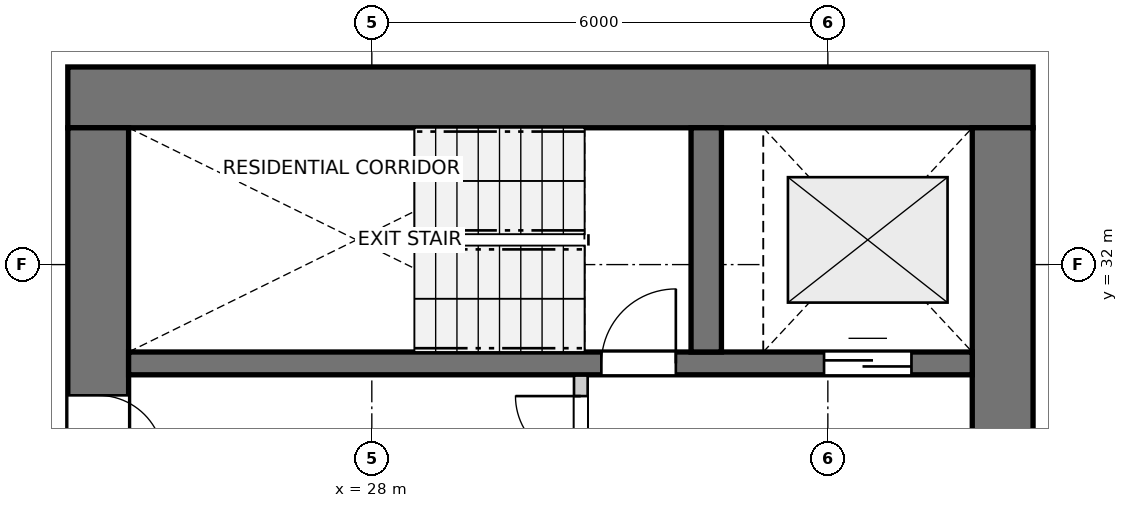
"""IFC4 building model, lengths in metres.
Left out: names, types, materials, properties, quantities, classifications, styles, units other than length and angle.
Written with IfcOpenShell. Run it as: python <this file> out.ifc"""

import sys

from ifc_helpers import new_model, si_unit, direction, frame, frame_2d, origin, place, context, subcontext, project, spatial, rectangle, extrude, source, transform, mapped, element, fill, save


model = new_model("IFC4")
c1 = context("Model", 3, precision=1e-05, world=origin(), true_north=direction((0.0, 1.0)))
c2 = subcontext(c1, "Body", "Model", "MODEL_VIEW")
j1 = project(units=[si_unit("LENGTHUNIT", "METRE"), si_unit("PLANEANGLEUNIT", "RADIAN")], contexts=[c1])
p1 = place(None, origin())
s1 = spatial("IfcSite", under=j1, at=p1, CompositionType="ELEMENT")
p2 = place(p1, origin())
s2 = spatial("IfcBuilding", under=s1, at=p2, CompositionType="ELEMENT")
p3 = place(p2, frame((0.0, 0.0, 11.0)))
s3 = spatial("IfcBuildingStorey", under=s2, at=p3, CompositionType="ELEMENT", Elevation=11.0)
p4 = place(p3, frame((36.7, 34.2, 0.0), z_axis=(0.0, 0.0, 1.0), x_axis=(-1.0, 0.0, 0.0)))
e1 = element("IfcWall", 1, at=p4, inside=s3, PredefinedType="SHEAR", context=c2, shape_type="SweptSolid", body=[
    extrude(rectangle(XDim=12.7, YDim=0.8, at=frame_2d((6.35, 0.0))), origin(), (0.0, 0.0, 1.0), 2.94),
])
p5 = place(p3, frame((24.4, 33.8, 0.0), z_axis=(0.0, 0.0, 1.0), x_axis=(0.0, -1.0, 0.0)))
e2 = element("IfcWall", 2, at=p5, inside=s3, PredefinedType="SHEAR", context=c2, shape_type="SweptSolid", body=[
    extrude(rectangle(XDim=15.6, YDim=0.8, at=frame_2d((7.8, 0.0))), origin(), (0.0, 0.0, 1.0), 2.94),
])
p6 = place(p5, frame((7.05, 0.0, 0.0)))
e3 = element("IfcOpeningElement", 3, at=p6, cuts=e2, PredefinedType="OPENING", context=c2, shape_type="SweptSolid", body=[
    extrude(rectangle(XDim=1.5, YDim=2.15, at=frame_2d((0.75, 1.075))), frame((0.0, 0.41, 0.0), z_axis=(0.0, -1.0, 0.0), x_axis=(1.0, 0.0, 0.0)), (0.0, 0.0, 1.0), 0.82),
])
p7 = place(p5, frame((3.52, 0.0, 0.0)))
e4 = element("IfcOpeningElement", 4, at=p7, cuts=e2, PredefinedType="OPENING", context=c2, shape_type="SweptSolid", body=[
    extrude(rectangle(XDim=0.86, YDim=2.05, at=frame_2d((0.43, 1.025))), frame((0.0, 0.41, 0.0), z_axis=(0.0, -1.0, 0.0), x_axis=(1.0, 0.0, 0.0)), (0.0, 0.0, 1.0), 0.82),
])
p8 = place(p5, frame((11.22, 0.0, 0.0)))
e5 = element("IfcOpeningElement", 5, at=p8, cuts=e2, PredefinedType="OPENING", context=c2, shape_type="SweptSolid", body=[
    extrude(rectangle(XDim=0.86, YDim=2.05, at=frame_2d((0.43, 1.025))), frame((0.0, 0.41, 0.0), z_axis=(0.0, -1.0, 0.0), x_axis=(1.0, 0.0, 0.0)), (0.0, 0.0, 1.0), 0.82),
])
p9 = place(p3, frame((36.3, 18.2, 0.0), z_axis=(0.0, 0.0, 1.0), x_axis=(0.0, 1.0, 0.0)))
e6 = element("IfcWall", 6, at=p9, inside=s3, PredefinedType="SHEAR", context=c2, shape_type="SweptSolid", body=[
    extrude(rectangle(XDim=15.6, YDim=0.8, at=frame_2d((7.8, 0.0))), origin(), (0.0, 0.0, 1.0), 2.94),
])
p10 = place(p9, frame((4.25, 0.0, 0.0)))
e7 = element("IfcOpeningElement", 7, at=p10, cuts=e6, PredefinedType="OPENING", context=c2, shape_type="SweptSolid", body=[
    extrude(rectangle(XDim=1.1, YDim=2.15, at=frame_2d((0.55, 1.075))), frame((0.0, 0.41, 0.0), z_axis=(0.0, -1.0, 0.0), x_axis=(1.0, 0.0, 0.0)), (0.0, 0.0, 1.0), 0.82),
])
p11 = place(p9, frame((10.25, 0.0, 0.0)))
e8 = element("IfcOpeningElement", 8, at=p11, cuts=e6, PredefinedType="OPENING", context=c2, shape_type="SweptSolid", body=[
    extrude(rectangle(XDim=1.1, YDim=2.15, at=frame_2d((0.55, 1.075))), frame((0.0, 0.41, 0.0), z_axis=(0.0, -1.0, 0.0), x_axis=(1.0, 0.0, 0.0)), (0.0, 0.0, 1.0), 0.82),
])
p12 = place(p3, frame((24.8, 30.7, 0.0), z_axis=(0.0, 0.0, 1.0), x_axis=(1.0, 0.0, 0.0)))
e9 = element("IfcWall", 9, at=p12, inside=s3, PredefinedType="SHEAR", context=c2, shape_type="SweptSolid", body=[
    extrude(rectangle(XDim=11.1, YDim=0.3, at=frame_2d((5.55, 0.0))), origin(), (0.0, 0.0, 1.0), 2.94),
])
p13 = place(p12, frame((6.22, 0.0, 0.0)))
e10 = element("IfcOpeningElement", 10, at=p13, cuts=e9, PredefinedType="OPENING", context=c2, shape_type="SweptSolid", body=[
    extrude(rectangle(XDim=0.98, YDim=2.15, at=frame_2d((0.49, 1.075))), frame((0.0, 0.16, 0.0), z_axis=(0.0, -1.0, 0.0), x_axis=(1.0, 0.0, 0.0)), (0.0, 0.0, 1.0), 0.32),
])
p14 = place(p12, frame((9.15, 0.0, 0.0)))
e11 = element("IfcOpeningElement", 11, at=p14, cuts=e9, PredefinedType="OPENING", context=c2, shape_type="SweptSolid", body=[
    extrude(rectangle(XDim=1.15, YDim=2.15, at=frame_2d((0.575, 1.075))), frame((0.0, 0.16, 0.0), z_axis=(0.0, -1.0, 0.0), x_axis=(1.0, 0.0, 0.0)), (0.0, 0.0, 1.0), 0.32),
])
p15 = place(p3, frame((32.4, 30.85, 0.0), z_axis=(0.0, 0.0, 1.0), x_axis=(0.0, 1.0, 0.0)))
e12 = element("IfcWall", 12, at=p15, inside=s3, PredefinedType="SHEAR", context=c2, shape_type="SweptSolid", body=[
    extrude(rectangle(XDim=2.95, YDim=0.4, at=frame_2d((1.475, 0.0))), origin(), (0.0, 0.0, 1.0), 2.94),
])
p16 = place(p3, frame((30.75, 27.43, 0.0), z_axis=(0.0, 0.0, 1.0), x_axis=(0.0, 1.0, 0.0)))
e13 = element("IfcWall", 13, at=p16, inside=s3, PredefinedType="PARTITIONING", context=c2, shape_type="SweptSolid", body=[
    extrude(rectangle(XDim=3.11, YDim=0.18, at=frame_2d((1.555, 0.0))), origin(), (0.0, 0.0, 1.0), 2.94),
])
p17 = place(p16, frame((1.98, 0.0, 0.0)))
e14 = element("IfcOpeningElement", 14, at=p17, cuts=e13, PredefinedType="OPENING", context=c2, shape_type="SweptSolid", body=[
    extrude(rectangle(XDim=0.86, YDim=2.05, at=frame_2d((0.43, 1.025))), frame((0.0, 0.1, 0.0), z_axis=(0.0, -1.0, 0.0), x_axis=(1.0, 0.0, 0.0)), (0.0, 0.0, 1.0), 0.2),
])
m1 = source(origin(), c2, "Body", "SweptSolid", [
    extrude(rectangle(XDim=0.98, YDim=2.15, at=frame_2d((0.49, 1.075))), frame((0.0, 0.025, 0.0), z_axis=(0.0, -1.0, 0.0), x_axis=(1.0, 0.0, 0.0)), (0.0, 0.0, 1.0), 0.05),
])
p18 = place(p13, origin())
e15 = element("IfcDoor", 15, at=p18, inside=s3, OperationType="SINGLE_SWING_RIGHT", PredefinedType="DOOR", context=c2, shape_type="MappedRepresentation", body=[
    mapped(m1, transform((0.0, 0.0, 0.0), x_axis=(1.0, 0.0, 0.0), y_axis=(0.0, 1.0, 0.0), z_axis=(0.0, 0.0, 1.0), scale=1.0)),
])
fill(e10, e15)
m2 = source(origin(), c2, "Body", "SweptSolid", [
    extrude(rectangle(XDim=1.15, YDim=2.15, at=frame_2d((0.575, 1.075))), frame((0.0, 0.025, 0.0), z_axis=(0.0, -1.0, 0.0), x_axis=(1.0, 0.0, 0.0)), (0.0, 0.0, 1.0), 0.05),
])
p19 = place(p14, origin())
e16 = element("IfcDoor", 16, at=p19, inside=s3, OperationType="DOUBLE_DOOR_SLIDING", PredefinedType="DOOR", context=c2, shape_type="MappedRepresentation", body=[
    mapped(m2, transform((0.0, 0.0, 0.0), x_axis=(1.0, 0.0, 0.0), y_axis=(0.0, 1.0, 0.0), z_axis=(0.0, 0.0, 1.0), scale=1.0)),
])
fill(e11, e16)
m3 = source(origin(), c2, "Body", "SweptSolid", [
    extrude(rectangle(XDim=0.86, YDim=2.05, at=frame_2d((0.43, 1.025))), frame((0.0, 0.025, 0.0), z_axis=(0.0, -1.0, 0.0), x_axis=(1.0, 0.0, 0.0)), (0.0, 0.0, 1.0), 0.05),
])
p20 = place(p7, origin())
e17 = element("IfcDoor", 17, at=p20, inside=s3, OperationType="SINGLE_SWING_RIGHT", PredefinedType="DOOR", context=c2, shape_type="MappedRepresentation", body=[
    mapped(m3, transform((0.0, 0.0, 0.0), x_axis=(1.0, 0.0, 0.0), y_axis=(0.0, 1.0, 0.0), z_axis=(0.0, 0.0, 1.0), scale=1.0)),
])
fill(e4, e17)
p21 = place(p17, origin())
e18 = element("IfcDoor", 18, at=p21, inside=s3, OperationType="SINGLE_SWING_RIGHT", PredefinedType="DOOR", context=c2, shape_type="MappedRepresentation", body=[
    mapped(m3, transform((0.0, 0.0, 0.0), x_axis=(1.0, 0.0, 0.0), y_axis=(0.0, 1.0, 0.0), z_axis=(0.0, 0.0, 1.0), scale=1.0)),
])
fill(e14, e18)
save(model, sys.argv[1])
